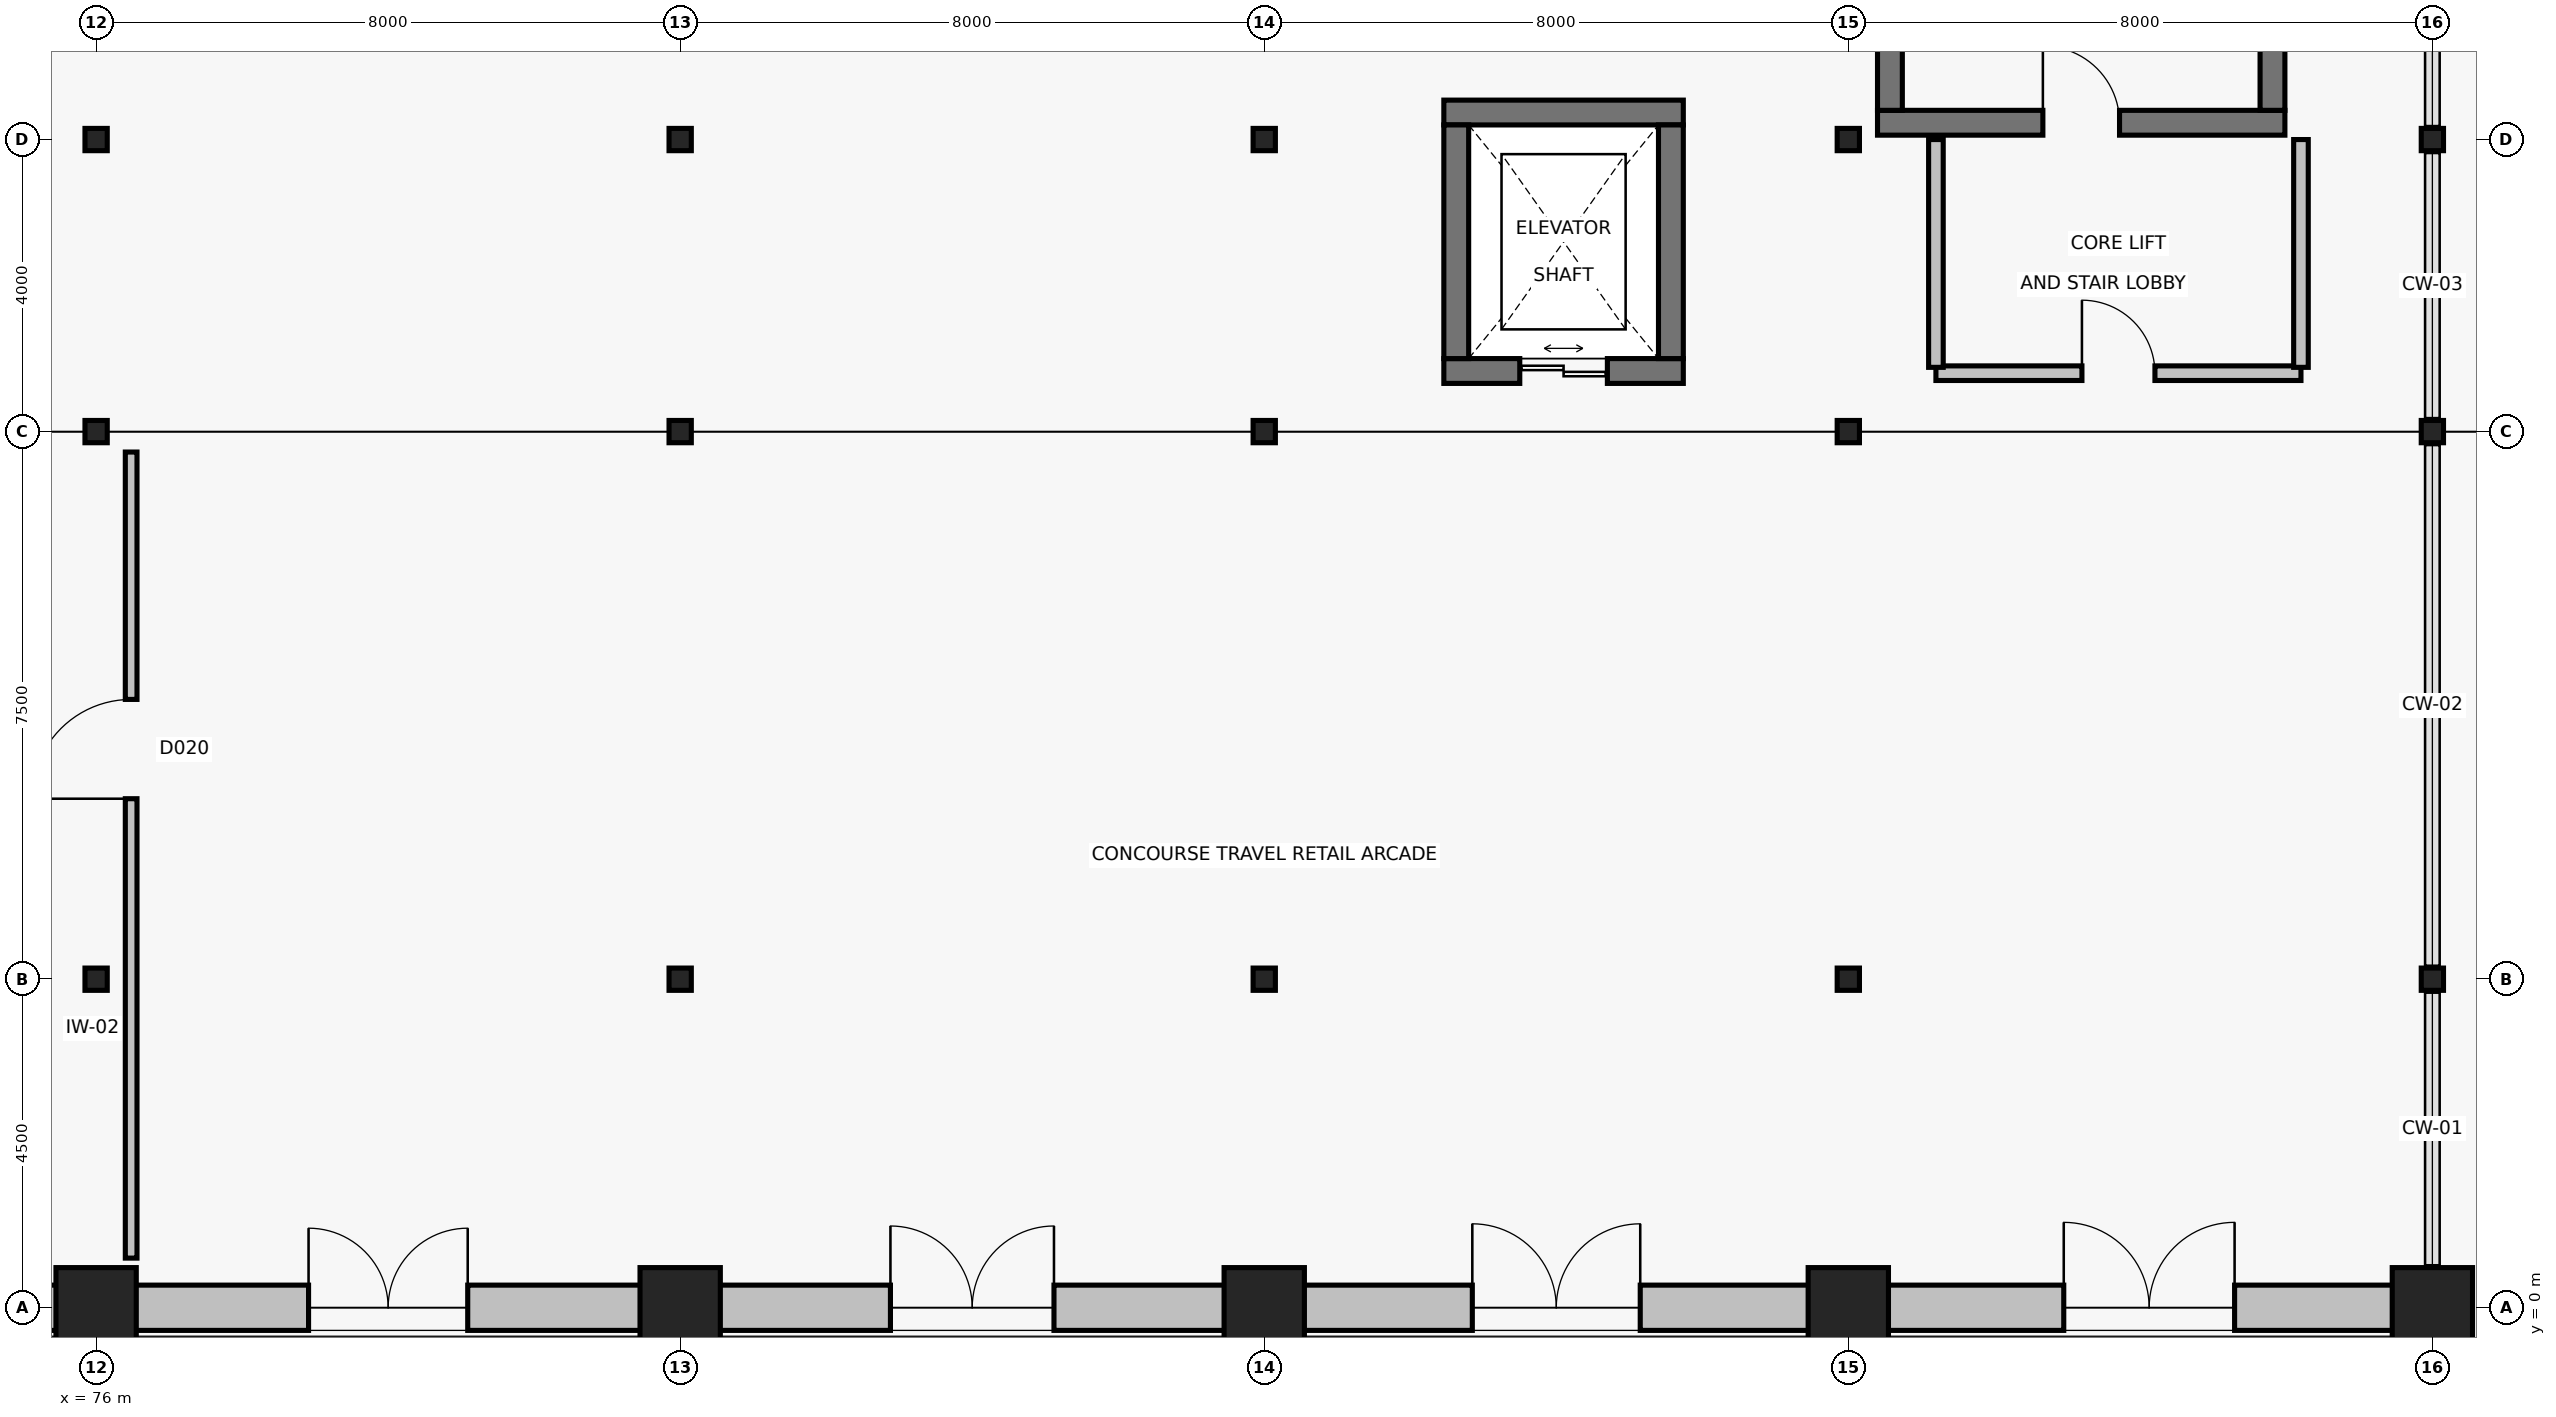
"""IFC4 building model, lengths in metres.
Left out: names, types, materials, properties, quantities, classifications, styles, units other than length and angle.
Written with IfcOpenShell. Run it as: python <this file> out.ifc"""

import sys

from ifc_helpers import new_model, si_unit, direction, frame, frame_2d, origin, origin_2d, place, context, subcontext, project, spatial, rectangle, hollow_rectangle, circle, extrude, element, fill, save


model = new_model("IFC4")
c1 = context("Model", 3, precision=1e-05, world=origin(), true_north=direction((0.0, 1.0)))
c2 = subcontext(c1, "Body", "Model", "MODEL_VIEW")
j1 = project(units=[si_unit("LENGTHUNIT", "METRE"), si_unit("PLANEANGLEUNIT", "RADIAN")], contexts=[c1])
p1 = place(None, origin())
s1 = spatial("IfcSite", under=j1, at=p1, CompositionType="ELEMENT")
p2 = place(p1, origin())
s2 = spatial("IfcBuilding", under=s1, at=p2, CompositionType="ELEMENT")
p3 = place(p2, origin())
s3 = spatial("IfcBuildingStorey", under=s2, at=p3, CompositionType="ELEMENT", Elevation=0.0)
p4 = place(p3, frame((76.0, 0.0, 0.0), z_axis=(0.0, 0.0, 1.0), x_axis=(1.0, 0.0, 0.0)))
e1 = element("IfcColumn", 1, at=p4, inside=s3, PredefinedType="COLUMN", context=c2, shape_type="SweptSolid", body=[
    extrude(circle(Radius=0.55, at=origin_2d()), origin(), (0.0, 0.0, 1.0), 6.6),
])
for number, where, z_axis, x_axis in (
    (2, (76.0, 4.5, 0.0), (0.0, 0.0, 1.0), (1.0, 0.0, 0.0)),
    (3, (76.0, 12.0, 0.0), (0.0, 0.0, 1.0), (1.0, 0.0, 0.0)),
    (4, (76.0, 16.0, 0.0), (0.0, 0.0, 1.0), (1.0, 0.0, 0.0)),
):
    element("IfcColumn", number, at=place(p3, frame(where, z_axis=z_axis, x_axis=x_axis)), inside=s3, PredefinedType="COLUMN", context=c2, shape_type="SweptSolid", body=[
        extrude(hollow_rectangle(XDim=0.305, YDim=0.305, WallThickness=0.013, InnerFilletRadius=0.013, OuterFilletRadius=0.025, at=origin_2d()), origin(), (0.0, 0.0, 1.0), 6.6),
    ])
p5 = place(p3, frame((84.0, 0.0, 0.0), z_axis=(0.0, 0.0, 1.0), x_axis=(1.0, 0.0, 0.0)))
e5 = element("IfcColumn", 5, at=p5, inside=s3, PredefinedType="COLUMN", context=c2, shape_type="SweptSolid", body=[
    extrude(circle(Radius=0.55, at=origin_2d()), origin(), (0.0, 0.0, 1.0), 6.6),
])
for number, where, z_axis, x_axis in (
    (6, (84.0, 4.5, 0.0), (0.0, 0.0, 1.0), (1.0, 0.0, 0.0)),
    (7, (84.0, 12.0, 0.0), (0.0, 0.0, 1.0), (1.0, 0.0, 0.0)),
    (8, (84.0, 16.0, 0.0), (0.0, 0.0, 1.0), (1.0, 0.0, 0.0)),
):
    element("IfcColumn", number, at=place(p3, frame(where, z_axis=z_axis, x_axis=x_axis)), inside=s3, PredefinedType="COLUMN", context=c2, shape_type="SweptSolid", body=[
        extrude(hollow_rectangle(XDim=0.305, YDim=0.305, WallThickness=0.013, InnerFilletRadius=0.013, OuterFilletRadius=0.025, at=origin_2d()), origin(), (0.0, 0.0, 1.0), 6.6),
    ])
p6 = place(p3, frame((92.0, 0.0, 0.0), z_axis=(0.0, 0.0, 1.0), x_axis=(1.0, 0.0, 0.0)))
e9 = element("IfcColumn", 9, at=p6, inside=s3, PredefinedType="COLUMN", context=c2, shape_type="SweptSolid", body=[
    extrude(circle(Radius=0.55, at=origin_2d()), origin(), (0.0, 0.0, 1.0), 6.6),
])
for number, where, z_axis, x_axis in (
    (10, (92.0, 4.5, 0.0), (0.0, 0.0, 1.0), (1.0, 0.0, 0.0)),
    (11, (92.0, 12.0, 0.0), (0.0, 0.0, 1.0), (1.0, 0.0, 0.0)),
    (12, (92.0, 16.0, 0.0), (0.0, 0.0, 1.0), (1.0, 0.0, 0.0)),
):
    element("IfcColumn", number, at=place(p3, frame(where, z_axis=z_axis, x_axis=x_axis)), inside=s3, PredefinedType="COLUMN", context=c2, shape_type="SweptSolid", body=[
        extrude(hollow_rectangle(XDim=0.305, YDim=0.305, WallThickness=0.013, InnerFilletRadius=0.013, OuterFilletRadius=0.025, at=origin_2d()), origin(), (0.0, 0.0, 1.0), 6.6),
    ])
p7 = place(p3, frame((100.0, 0.0, 0.0), z_axis=(0.0, 0.0, 1.0), x_axis=(1.0, 0.0, 0.0)))
e13 = element("IfcColumn", 13, at=p7, inside=s3, PredefinedType="COLUMN", context=c2, shape_type="SweptSolid", body=[
    extrude(circle(Radius=0.55, at=origin_2d()), origin(), (0.0, 0.0, 1.0), 6.6),
])
for number, where, z_axis, x_axis in (
    (14, (100.0, 4.5, 0.0), (0.0, 0.0, 1.0), (1.0, 0.0, 0.0)),
    (15, (100.0, 12.0, 0.0), (0.0, 0.0, 1.0), (1.0, 0.0, 0.0)),
    (16, (100.0, 16.0, 0.0), (0.0, 0.0, 1.0), (1.0, 0.0, 0.0)),
):
    element("IfcColumn", number, at=place(p3, frame(where, z_axis=z_axis, x_axis=x_axis)), inside=s3, PredefinedType="COLUMN", context=c2, shape_type="SweptSolid", body=[
        extrude(hollow_rectangle(XDim=0.305, YDim=0.305, WallThickness=0.013, InnerFilletRadius=0.013, OuterFilletRadius=0.025, at=origin_2d()), origin(), (0.0, 0.0, 1.0), 6.6),
    ])
p8 = place(p3, frame((108.0, 0.0, 0.0), z_axis=(0.0, 0.0, 1.0), x_axis=(1.0, 0.0, 0.0)))
e17 = element("IfcColumn", 17, at=p8, inside=s3, PredefinedType="COLUMN", context=c2, shape_type="SweptSolid", body=[
    extrude(circle(Radius=0.55, at=origin_2d()), origin(), (0.0, 0.0, 1.0), 6.6),
])
for number, where, z_axis, x_axis in (
    (18, (108.0, 4.5, 0.0), (0.0, 0.0, 1.0), (1.0, 0.0, 0.0)),
    (19, (108.0, 12.0, 0.0), (0.0, 0.0, 1.0), (1.0, 0.0, 0.0)),
    (20, (108.0, 16.0, 0.0), (0.0, 0.0, 1.0), (1.0, 0.0, 0.0)),
):
    element("IfcColumn", number, at=place(p3, frame(where, z_axis=z_axis, x_axis=x_axis)), inside=s3, PredefinedType="COLUMN", context=c2, shape_type="SweptSolid", body=[
        extrude(hollow_rectangle(XDim=0.305, YDim=0.305, WallThickness=0.013, InnerFilletRadius=0.013, OuterFilletRadius=0.025, at=origin_2d()), origin(), (0.0, 0.0, 1.0), 6.6),
    ])
p9 = place(p3, frame((67.992, 0.0, 0.0), z_axis=(0.0, 0.0, 1.0), x_axis=(1.0, 0.0, 0.0)))
e21 = element("IfcWall", 21, at=p9, inside=s3, PredefinedType="SOLIDWALL", context=c2, shape_type="SweptSolid", body=[
    extrude(rectangle(XDim=8.016, YDim=0.62, at=frame_2d((4.008, 0.0))), origin(), (0.0, 0.0, 1.0), 3.953),
])
p10 = place(p9, frame((2.948, 0.0, 0.0)))
e22 = element("IfcOpeningElement", 22, at=p10, cuts=e21, PredefinedType="OPENING", context=c2, shape_type="SweptSolid", body=[
    extrude(rectangle(XDim=2.12, YDim=2.5, at=frame_2d((1.06, 1.25))), frame((0.0, 0.325, 0.0), z_axis=(0.0, -1.0, 0.0), x_axis=(1.0, 0.0, 0.0)), (0.0, 0.0, 1.0), 0.65),
])
p11 = place(p3, frame((75.992, 0.0, 0.0), z_axis=(0.0, 0.0, 1.0), x_axis=(1.0, 0.0, 0.0)))
e23 = element("IfcWall", 23, at=p11, inside=s3, PredefinedType="SOLIDWALL", context=c2, shape_type="SweptSolid", body=[
    extrude(rectangle(XDim=8.016, YDim=0.62, at=frame_2d((4.008, 0.0))), origin(), (0.0, 0.0, 1.0), 3.953),
])
p12 = place(p11, frame((2.918, 0.0, 0.0)))
e24 = element("IfcOpeningElement", 24, at=p12, cuts=e23, PredefinedType="OPENING", context=c2, shape_type="SweptSolid", body=[
    extrude(rectangle(XDim=2.18, YDim=2.55, at=frame_2d((1.09, 1.275))), frame((0.0, 0.325, 0.0), z_axis=(0.0, -1.0, 0.0), x_axis=(1.0, 0.0, 0.0)), (0.0, 0.0, 1.0), 0.65),
])
p13 = place(p3, frame((83.992, 0.0, 0.0), z_axis=(0.0, 0.0, 1.0), x_axis=(1.0, 0.0, 0.0)))
e25 = element("IfcWall", 25, at=p13, inside=s3, PredefinedType="SOLIDWALL", context=c2, shape_type="SweptSolid", body=[
    extrude(rectangle(XDim=8.016, YDim=0.62, at=frame_2d((4.008, 0.0))), origin(), (0.0, 0.0, 1.0), 3.953),
])
p14 = place(p13, frame((2.888, 0.0, 0.0)))
e26 = element("IfcOpeningElement", 26, at=p14, cuts=e25, PredefinedType="OPENING", context=c2, shape_type="SweptSolid", body=[
    extrude(rectangle(XDim=2.24, YDim=2.6, at=frame_2d((1.12, 1.3))), frame((0.0, 0.325, 0.0), z_axis=(0.0, -1.0, 0.0), x_axis=(1.0, 0.0, 0.0)), (0.0, 0.0, 1.0), 0.65),
])
p15 = place(p3, frame((91.992, 0.0, 0.0), z_axis=(0.0, 0.0, 1.0), x_axis=(1.0, 0.0, 0.0)))
e27 = element("IfcWall", 27, at=p15, inside=s3, PredefinedType="SOLIDWALL", context=c2, shape_type="SweptSolid", body=[
    extrude(rectangle(XDim=8.016, YDim=0.62, at=frame_2d((4.008, 0.0))), origin(), (0.0, 0.0, 1.0), 3.953),
])
p16 = place(p15, frame((2.858, 0.0, 0.0)))
e28 = element("IfcOpeningElement", 28, at=p16, cuts=e27, PredefinedType="OPENING", context=c2, shape_type="SweptSolid", body=[
    extrude(rectangle(XDim=2.3, YDim=2.65, at=frame_2d((1.15, 1.325))), frame((0.0, 0.325, 0.0), z_axis=(0.0, -1.0, 0.0), x_axis=(1.0, 0.0, 0.0)), (0.0, 0.0, 1.0), 0.65),
])
p17 = place(p3, frame((99.992, 0.0, 0.0), z_axis=(0.0, 0.0, 1.0), x_axis=(1.0, 0.0, 0.0)))
e29 = element("IfcWall", 29, at=p17, inside=s3, PredefinedType="SOLIDWALL", context=c2, shape_type="SweptSolid", body=[
    extrude(rectangle(XDim=8.258, YDim=0.62, at=frame_2d((4.129, 0.0))), origin(), (0.0, 0.0, 1.0), 3.953),
])
p18 = place(p17, frame((2.959, 0.0, 0.0)))
e30 = element("IfcOpeningElement", 30, at=p18, cuts=e29, PredefinedType="OPENING", context=c2, shape_type="SweptSolid", body=[
    extrude(rectangle(XDim=2.34, YDim=2.75, at=frame_2d((1.17, 1.375))), frame((0.0, 0.325, 0.0), z_axis=(0.0, -1.0, 0.0), x_axis=(1.0, 0.0, 0.0)), (0.0, 0.0, 1.0), 0.65),
])
p19 = place(p3, frame((100.4, 16.23, 0.0), z_axis=(0.0, 0.0, 1.0), x_axis=(1.0, 0.0, 0.0)))
e31 = element("IfcWall", 31, at=p19, inside=s3, PredefinedType="SHEAR", context=c2, shape_type="SweptSolid", body=[
    extrude(rectangle(XDim=5.58, YDim=0.34, at=frame_2d((2.79, 0.0))), origin(), (0.0, 0.0, 1.0), 6.32),
])
p20 = place(p19, frame((2.265, 0.0, 0.0)))
e32 = element("IfcOpeningElement", 32, at=p20, cuts=e31, PredefinedType="OPENING", context=c2, shape_type="SweptSolid", body=[
    extrude(rectangle(XDim=1.05, YDim=2.15, at=frame_2d((0.525, 1.075))), frame((0.0, 0.185, 0.0), z_axis=(0.0, -1.0, 0.0), x_axis=(1.0, 0.0, 0.0)), (0.0, 0.0, 1.0), 0.37),
])
for number, where, z_axis, x_axis in (
    (33, (100.57, 26.4, 0.0), (0.0, 0.0, 1.0), (0.0, -1.0, 0.0)),
    (34, (105.81, 16.4, 0.0), (0.0, 0.0, 1.0), (0.0, 1.0, 0.0)),
):
    element("IfcWall", number, at=place(p3, frame(where, z_axis=z_axis, x_axis=x_axis)), inside=s3, PredefinedType="SHEAR", context=c2, shape_type="SweptSolid", body=[
        extrude(rectangle(XDim=10.0, YDim=0.34, at=frame_2d((5.0, 0.0))), origin(), (0.0, 0.0, 1.0), 6.32),
    ])
p21 = place(p3, frame((94.46, 12.83, 0.0), z_axis=(0.0, 0.0, 1.0), x_axis=(1.0, 0.0, 0.0)))
e35 = element("IfcWall", 35, at=p21, inside=s3, PredefinedType="SHEAR", context=c2, shape_type="SweptSolid", body=[
    extrude(rectangle(XDim=3.28, YDim=0.34, at=frame_2d((1.64, 0.0))), origin(), (0.0, 0.0, 1.0), 6.32),
])
p22 = place(p21, frame((1.04, 0.0, 0.0)))
e36 = element("IfcOpeningElement", 36, at=p22, cuts=e35, PredefinedType="OPENING", context=c2, shape_type="SweptSolid", body=[
    extrude(rectangle(XDim=1.2, YDim=2.2, at=frame_2d((0.6, 1.1))), frame((0.0, 0.185, 0.0), z_axis=(0.0, -1.0, 0.0), x_axis=(1.0, 0.0, 0.0)), (0.0, 0.0, 1.0), 0.37),
])
p23 = place(p3, frame((97.74, 16.37, 0.0), z_axis=(0.0, 0.0, 1.0), x_axis=(-1.0, 0.0, 0.0)))
e37 = element("IfcWall", 37, at=p23, inside=s3, PredefinedType="SHEAR", context=c2, shape_type="SweptSolid", body=[
    extrude(rectangle(XDim=3.28, YDim=0.34, at=frame_2d((1.64, 0.0))), origin(), (0.0, 0.0, 1.0), 6.32),
])
for number, where, z_axis, x_axis in (
    (38, (94.63, 16.2, 0.0), (0.0, 0.0, 1.0), (0.0, -1.0, 0.0)),
    (39, (97.57, 13.0, 0.0), (0.0, 0.0, 1.0), (0.0, 1.0, 0.0)),
):
    element("IfcWall", number, at=place(p3, frame(where, z_axis=z_axis, x_axis=x_axis)), inside=s3, PredefinedType="SHEAR", context=c2, shape_type="SweptSolid", body=[
        extrude(rectangle(XDim=3.2, YDim=0.34, at=frame_2d((1.6, 0.0))), origin(), (0.0, 0.0, 1.0), 6.32),
    ])
p24 = place(p3, frame((101.2, 12.8, 0.0), z_axis=(0.0, 0.0, 1.0), x_axis=(1.0, 0.0, 0.0)))
e40 = element("IfcWall", 40, at=p24, inside=s3, PredefinedType="PARTITIONING", context=c2, shape_type="SweptSolid", body=[
    extrude(rectangle(XDim=5.0, YDim=0.2, at=frame_2d((2.5, 0.0))), origin(), (0.0, 0.0, 1.0), 5.942),
])
p25 = place(p24, frame((2.0, 0.0, 0.0)))
e41 = element("IfcOpeningElement", 41, at=p25, cuts=e40, PredefinedType="OPENING", context=c2, shape_type="SweptSolid", body=[
    extrude(rectangle(XDim=1.0, YDim=2.15, at=frame_2d((0.5, 1.075))), frame((0.0, 0.115, 0.0), z_axis=(0.0, -1.0, 0.0), x_axis=(1.0, 0.0, 0.0)), (0.0, 0.0, 1.0), 0.23),
])
for number, where, z_axis, x_axis in (
    (42, (101.2, 16.0, 0.0), (0.0, 0.0, 1.0), (0.0, -1.0, 0.0)),
    (43, (106.2, 12.88, 0.0), (0.0, 0.0, 1.0), (0.0, 1.0, 0.0)),
):
    element("IfcWall", number, at=place(p3, frame(where, z_axis=z_axis, x_axis=x_axis)), inside=s3, PredefinedType="PARTITIONING", context=c2, shape_type="SweptSolid", body=[
        extrude(rectangle(XDim=3.12, YDim=0.2, at=frame_2d((1.56, 0.0))), origin(), (0.0, 0.0, 1.0), 5.689),
    ])
p26 = place(p3, frame((76.48, 0.68, 0.0), z_axis=(0.0, 0.0, 1.0), x_axis=(0.0, 1.0, 0.0)))
e44 = element("IfcWall", 44, at=p26, inside=s3, PredefinedType="PARTITIONING", context=c2, shape_type="SweptSolid", body=[
    extrude(rectangle(XDim=11.04, YDim=0.16, at=frame_2d((5.52, 0.0))), origin(), (0.0, 0.0, 1.0), 5.689),
])
p27 = place(p26, frame((6.292, 0.0, 0.0)))
e45 = element("IfcOpeningElement", 45, at=p27, cuts=e44, PredefinedType="OPENING", context=c2, shape_type="SweptSolid", body=[
    extrude(rectangle(XDim=1.36, YDim=2.2, at=frame_2d((0.68, 1.1))), frame((0.0, 0.095, 0.0), z_axis=(0.0, -1.0, 0.0), x_axis=(1.0, 0.0, 0.0)), (0.0, 0.0, 1.0), 0.19),
])
p28 = place(p12, origin())
e46 = element("IfcDoor", 46, at=p28, inside=s3, OperationType="DOUBLE_DOOR_SINGLE_SWING", PredefinedType="DOOR", context=c2, shape_type="SweptSolid", body=[
    extrude(rectangle(XDim=2.18, YDim=2.55, at=frame_2d((1.09, 1.275))), frame((0.0, 0.025, 0.0), z_axis=(0.0, -1.0, 0.0), x_axis=(1.0, 0.0, 0.0)), (0.0, 0.0, 1.0), 0.05),
])
fill(e24, e46)
p29 = place(p14, origin())
e47 = element("IfcDoor", 47, at=p29, inside=s3, OperationType="DOUBLE_DOOR_SINGLE_SWING", PredefinedType="DOOR", context=c2, shape_type="SweptSolid", body=[
    extrude(rectangle(XDim=2.24, YDim=2.6, at=frame_2d((1.12, 1.3))), frame((0.0, 0.025, 0.0), z_axis=(0.0, -1.0, 0.0), x_axis=(1.0, 0.0, 0.0)), (0.0, 0.0, 1.0), 0.05),
])
fill(e26, e47)
p30 = place(p16, origin())
e48 = element("IfcDoor", 48, at=p30, inside=s3, OperationType="DOUBLE_DOOR_SINGLE_SWING", PredefinedType="DOOR", context=c2, shape_type="SweptSolid", body=[
    extrude(rectangle(XDim=2.3, YDim=2.65, at=frame_2d((1.15, 1.325))), frame((0.0, 0.025, 0.0), z_axis=(0.0, -1.0, 0.0), x_axis=(1.0, 0.0, 0.0)), (0.0, 0.0, 1.0), 0.05),
])
fill(e28, e48)
p31 = place(p18, origin())
e49 = element("IfcDoor", 49, at=p31, inside=s3, OperationType="DOUBLE_DOOR_SINGLE_SWING", PredefinedType="DOOR", context=c2, shape_type="SweptSolid", body=[
    extrude(rectangle(XDim=2.34, YDim=2.75, at=frame_2d((1.17, 1.375))), frame((0.0, 0.025, 0.0), z_axis=(0.0, -1.0, 0.0), x_axis=(1.0, 0.0, 0.0)), (0.0, 0.0, 1.0), 0.05),
])
fill(e30, e49)
p32 = place(p20, origin())
e50 = element("IfcDoor", 50, at=p32, inside=s3, OperationType="SINGLE_SWING_LEFT", PredefinedType="DOOR", context=c2, shape_type="SweptSolid", body=[
    extrude(rectangle(XDim=1.05, YDim=2.15, at=frame_2d((0.525, 1.075))), frame((0.0, 0.025, 0.0), z_axis=(0.0, -1.0, 0.0), x_axis=(1.0, 0.0, 0.0)), (0.0, 0.0, 1.0), 0.05),
])
fill(e32, e50)
p33 = place(p22, origin())
e51 = element("IfcDoor", 51, at=p33, inside=s3, OperationType="DOUBLE_DOOR_SLIDING", PredefinedType="DOOR", context=c2, shape_type="SweptSolid", body=[
    extrude(rectangle(XDim=1.2, YDim=2.2, at=frame_2d((0.6, 1.1))), frame((0.0, 0.025, 0.0), z_axis=(0.0, -1.0, 0.0), x_axis=(1.0, 0.0, 0.0)), (0.0, 0.0, 1.0), 0.05),
])
fill(e36, e51)
p34 = place(p25, origin())
e52 = element("IfcDoor", 52, at=p34, inside=s3, OperationType="SINGLE_SWING_LEFT", PredefinedType="DOOR", context=c2, shape_type="SweptSolid", body=[
    extrude(rectangle(XDim=1.0, YDim=2.15, at=frame_2d((0.5, 1.075))), frame((0.0, 0.025, 0.0), z_axis=(0.0, -1.0, 0.0), x_axis=(1.0, 0.0, 0.0)), (0.0, 0.0, 1.0), 0.05),
])
fill(e41, e52)
p35 = place(p27, origin())
e53 = element("IfcDoor", 53, at=p35, inside=s3, OperationType="SINGLE_SWING_LEFT", PredefinedType="DOOR", context=c2, shape_type="SweptSolid", body=[
    extrude(rectangle(XDim=1.36, YDim=2.2, at=frame_2d((0.68, 1.1))), frame((0.0, 0.025, 0.0), z_axis=(0.0, -1.0, 0.0), x_axis=(1.0, 0.0, 0.0)), (0.0, 0.0, 1.0), 0.05),
])
fill(e45, e53)
save(model, sys.argv[1])
